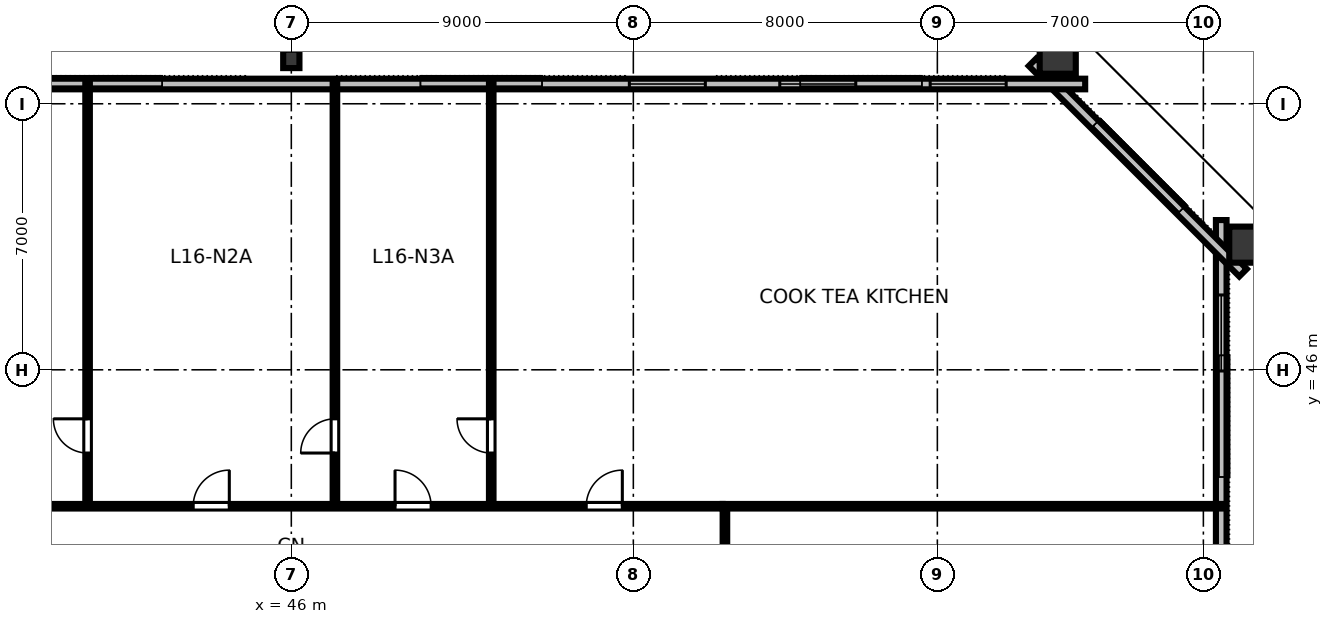
"""IFC4 building model, lengths in metres.
Left out: names, types, materials, properties, quantities, classifications, styles, units other than length and angle.
Written with IfcOpenShell. Run it as: python <this file> out.ifc"""

import sys

from ifc_helpers import new_model, si_unit, direction, frame, frame_2d, origin, origin_2d, place, context, subcontext, project, spatial, rectangle, hollow_rectangle, i_section, extrude, element, fill, save


model = new_model("IFC4")
c1 = context("Model", 3, precision=1e-05, world=origin(), true_north=direction((0.0, 1.0)))
c2 = subcontext(c1, "Body", "Model", "MODEL_VIEW")
j1 = project(units=[si_unit("LENGTHUNIT", "METRE"), si_unit("PLANEANGLEUNIT", "RADIAN")], contexts=[c1])
p1 = place(None, origin())
s1 = spatial("IfcSite", under=j1, at=p1, CompositionType="ELEMENT")
p2 = place(p1, origin())
s2 = spatial("IfcBuilding", under=s1, at=p2, CompositionType="ELEMENT")
p3 = place(p2, frame((0.0, 0.0, 64.0)))
s3 = spatial("IfcBuildingStorey", under=s2, at=p3, CompositionType="ELEMENT", Elevation=64.0)
for number, where, z_axis, x_axis in (
    (1, (71.256, 49.293, 0.0), (0.0, 0.0, 1.0), (0.0, 1.0, 0.0)),
    (2, (66.168, 54.365, 0.0), (0.0, 0.0, 1.0), (1.0, 0.0, 0.0)),
):
    element("IfcColumn", number, at=place(p3, frame(where, z_axis=z_axis, x_axis=x_axis)), inside=s3, PredefinedType="COLUMN", context=c2, shape_type="SweptSolid", body=[
        extrude(hollow_rectangle(XDim=0.95, YDim=1.15, WallThickness=0.06, at=origin_2d()), origin(), (0.0, 0.0, 1.0), 3.358),
    ])
p4 = place(p3, frame((46.0, 54.18, 0.0), z_axis=(0.0, 0.0, 1.0), x_axis=(1.0, 0.0, 0.0)))
e3 = element("IfcColumn", 3, at=p4, inside=s3, PredefinedType="COLUMN", context=c2, shape_type="SweptSolid", body=[
    extrude(i_section(OverallWidth=0.428, OverallDepth=0.483, WebThickness=0.051, FlangeThickness=0.082, FilletRadius=0.025, at=origin_2d()), origin(), (0.0, 0.0, 1.0), 3.358),
])
p5 = place(p3, frame((70.47, 14.06, 0.0), z_axis=(0.0, 0.0, 1.0), x_axis=(0.0, 1.0, 0.0)))
e4 = element("IfcWall", 4, at=p5, inside=s3, PredefinedType="STANDARD", context=c2, shape_type="SweptSolid", body=[
    extrude(rectangle(XDim=35.88, YDim=0.28, at=frame_2d((17.94, 0.0))), origin(), (0.0, 0.0, 1.0), 3.36),
])
p6 = place(p5, frame((19.29, 0.0, 0.0)))
e5 = element("IfcOpeningElement", 5, at=p6, cuts=e4, PredefinedType="OPENING", context=c2, shape_type="SweptSolid", body=[
    extrude(rectangle(XDim=1.4, YDim=2.15, at=frame_2d((0.7, 1.075))), frame((0.0, 0.15, 0.0), z_axis=(0.0, -1.0, 0.0), x_axis=(1.0, 0.0, 0.0)), (0.0, 0.0, 1.0), 0.3),
])
p7 = place(p5, frame((1.971, 0.0, 0.8)))
e6 = element("IfcOpeningElement", 6, at=p7, cuts=e4, PredefinedType="OPENING", context=c2, shape_type="SweptSolid", body=[
    extrude(rectangle(XDim=2.0, YDim=1.95, at=frame_2d((1.0, 0.975))), frame((0.0, 0.15, 0.0), z_axis=(0.0, -1.0, 0.0), x_axis=(1.0, 0.0, 0.0)), (0.0, 0.0, 1.0), 0.3),
])
p8 = place(p5, frame((9.456, 0.0, 0.8)))
e7 = element("IfcOpeningElement", 7, at=p8, cuts=e4, PredefinedType="OPENING", context=c2, shape_type="SweptSolid", body=[
    extrude(rectangle(XDim=2.0, YDim=1.95, at=frame_2d((1.0, 0.975))), frame((0.0, 0.15, 0.0), z_axis=(0.0, -1.0, 0.0), x_axis=(1.0, 0.0, 0.0)), (0.0, 0.0, 1.0), 0.3),
])
p9 = place(p5, frame((24.424, 0.0, 0.8)))
e8 = element("IfcOpeningElement", 8, at=p9, cuts=e4, PredefinedType="OPENING", context=c2, shape_type="SweptSolid", body=[
    extrude(rectangle(XDim=2.0, YDim=1.95, at=frame_2d((1.0, 0.975))), frame((0.0, 0.15, 0.0), z_axis=(0.0, -1.0, 0.0), x_axis=(1.0, 0.0, 0.0)), (0.0, 0.0, 1.0), 0.3),
])
p10 = place(p5, frame((31.909, 0.0, 0.8)))
e9 = element("IfcOpeningElement", 9, at=p10, cuts=e4, PredefinedType="OPENING", context=c2, shape_type="SweptSolid", body=[
    extrude(rectangle(XDim=2.0, YDim=1.95, at=frame_2d((1.0, 0.975))), frame((0.0, 0.15, 0.0), z_axis=(0.0, -1.0, 0.0), x_axis=(1.0, 0.0, 0.0)), (0.0, 0.0, 1.0), 0.3),
])
p11 = place(p3, frame((71.044, 48.554, 0.0), z_axis=(0.0, 0.0, 1.0), x_axis=(-0.707106781187, 0.707106781187, 0.0)))
e10 = element("IfcWall", 10, at=p11, inside=s3, PredefinedType="STANDARD", context=c2, shape_type="SweptSolid", body=[
    extrude(rectangle(XDim=7.834, YDim=0.28, at=frame_2d((3.917, 0.0))), origin(), (0.0, 0.0, 1.0), 3.36),
])
p12 = place(p3, frame((66.89, 53.52, 0.0), z_axis=(0.0, 0.0, 1.0), x_axis=(-1.0, 0.0, 0.0)))
e11 = element("IfcWall", 11, at=p12, inside=s3, PredefinedType="STANDARD", context=c2, shape_type="SweptSolid", body=[
    extrude(rectangle(XDim=41.78, YDim=0.28, at=frame_2d((20.89, 0.0))), origin(), (0.0, 0.0, 1.0), 3.36),
])
p13 = place(p12, frame((2.079, 0.0, 0.8)))
e12 = element("IfcOpeningElement", 12, at=p13, cuts=e11, PredefinedType="OPENING", context=c2, shape_type="SweptSolid", body=[
    extrude(rectangle(XDim=2.0, YDim=1.95, at=frame_2d((1.0, 0.975))), frame((0.0, 0.15, 0.0), z_axis=(0.0, -1.0, 0.0), x_axis=(1.0, 0.0, 0.0)), (0.0, 0.0, 1.0), 0.3),
])
p14 = place(p12, frame((6.037, 0.0, 0.8)))
e13 = element("IfcOpeningElement", 13, at=p14, cuts=e11, PredefinedType="OPENING", context=c2, shape_type="SweptSolid", body=[
    extrude(rectangle(XDim=2.0, YDim=1.95, at=frame_2d((1.0, 0.975))), frame((0.0, 0.15, 0.0), z_axis=(0.0, -1.0, 0.0), x_axis=(1.0, 0.0, 0.0)), (0.0, 0.0, 1.0), 0.3),
])
p15 = place(p12, frame((9.995, 0.0, 0.8)))
e14 = element("IfcOpeningElement", 14, at=p15, cuts=e11, PredefinedType="OPENING", context=c2, shape_type="SweptSolid", body=[
    extrude(rectangle(XDim=2.0, YDim=1.95, at=frame_2d((1.0, 0.975))), frame((0.0, 0.15, 0.0), z_axis=(0.0, -1.0, 0.0), x_axis=(1.0, 0.0, 0.0)), (0.0, 0.0, 1.0), 0.3),
])
p16 = place(p12, frame((29.785, 0.0, 0.8)))
e15 = element("IfcOpeningElement", 15, at=p16, cuts=e11, PredefinedType="OPENING", context=c2, shape_type="SweptSolid", body=[
    extrude(rectangle(XDim=2.0, YDim=1.95, at=frame_2d((1.0, 0.975))), frame((0.0, 0.15, 0.0), z_axis=(0.0, -1.0, 0.0), x_axis=(1.0, 0.0, 0.0)), (0.0, 0.0, 1.0), 0.3),
])
p17 = place(p12, frame((33.743, 0.0, 0.8)))
e16 = element("IfcOpeningElement", 16, at=p17, cuts=e11, PredefinedType="OPENING", context=c2, shape_type="SweptSolid", body=[
    extrude(rectangle(XDim=2.0, YDim=1.95, at=frame_2d((1.0, 0.975))), frame((0.0, 0.15, 0.0), z_axis=(0.0, -1.0, 0.0), x_axis=(1.0, 0.0, 0.0)), (0.0, 0.0, 1.0), 0.3),
])
p18 = place(p12, frame((37.701, 0.0, 0.8)))
e17 = element("IfcOpeningElement", 17, at=p18, cuts=e11, PredefinedType="OPENING", context=c2, shape_type="SweptSolid", body=[
    extrude(rectangle(XDim=2.0, YDim=1.95, at=frame_2d((1.0, 0.975))), frame((0.0, 0.15, 0.0), z_axis=(0.0, -1.0, 0.0), x_axis=(1.0, 0.0, 0.0)), (0.0, 0.0, 1.0), 0.3),
])
p19 = place(p3, frame((40.639, 42.41, 0.0), z_axis=(0.0, 0.0, 1.0), x_axis=(0.0, 1.0, 0.0)))
e18 = element("IfcWall", 18, at=p19, inside=s3, PredefinedType="PARTITIONING", context=c2, shape_type="SweptSolid", body=[
    extrude(rectangle(XDim=11.11, YDim=0.12, at=frame_2d((5.555, 0.0))), origin(), (0.0, 0.0, 1.0), 2.64),
])
p20 = place(p19, frame((1.4, 0.0, 0.0)))
e19 = element("IfcOpeningElement", 19, at=p20, cuts=e18, PredefinedType="OPENING", context=c2, shape_type="SweptSolid", body=[
    extrude(rectangle(XDim=0.9, YDim=2.15, at=frame_2d((0.45, 1.075))), frame((0.0, 0.07, 0.0), z_axis=(0.0, -1.0, 0.0), x_axis=(1.0, 0.0, 0.0)), (0.0, 0.0, 1.0), 0.14),
])
p21 = place(p3, frame((47.148, 42.41, 0.0), z_axis=(0.0, 0.0, 1.0), x_axis=(0.0, 1.0, 0.0)))
e20 = element("IfcWall", 20, at=p21, inside=s3, PredefinedType="PARTITIONING", context=c2, shape_type="SweptSolid", body=[
    extrude(rectangle(XDim=11.11, YDim=0.12, at=frame_2d((5.555, 0.0))), origin(), (0.0, 0.0, 1.0), 2.64),
])
p22 = place(p21, frame((1.4, 0.0, 0.0)))
e21 = element("IfcOpeningElement", 21, at=p22, cuts=e20, PredefinedType="OPENING", context=c2, shape_type="SweptSolid", body=[
    extrude(rectangle(XDim=0.9, YDim=2.15, at=frame_2d((0.45, 1.075))), frame((0.0, 0.07, 0.0), z_axis=(0.0, -1.0, 0.0), x_axis=(1.0, 0.0, 0.0)), (0.0, 0.0, 1.0), 0.14),
])
p23 = place(p3, frame((51.261, 42.41, 0.0), z_axis=(0.0, 0.0, 1.0), x_axis=(0.0, 1.0, 0.0)))
e22 = element("IfcWall", 22, at=p23, inside=s3, PredefinedType="PARTITIONING", context=c2, shape_type="SweptSolid", body=[
    extrude(rectangle(XDim=11.11, YDim=0.12, at=frame_2d((5.555, 0.0))), origin(), (0.0, 0.0, 1.0), 2.64),
])
p24 = place(p23, frame((1.4, 0.0, 0.0)))
e23 = element("IfcOpeningElement", 23, at=p24, cuts=e22, PredefinedType="OPENING", context=c2, shape_type="SweptSolid", body=[
    extrude(rectangle(XDim=0.9, YDim=2.15, at=frame_2d((0.45, 1.075))), frame((0.0, 0.07, 0.0), z_axis=(0.0, -1.0, 0.0), x_axis=(1.0, 0.0, 0.0)), (0.0, 0.0, 1.0), 0.14),
])
p25 = place(p3, frame((34.65, 42.41, 0.0), z_axis=(0.0, 0.0, 1.0), x_axis=(1.0, 0.0, 0.0)))
e24 = element("IfcWall", 24, at=p25, inside=s3, PredefinedType="PARTITIONING", context=c2, shape_type="SweptSolid", body=[
    extrude(rectangle(XDim=22.7, YDim=0.12, at=frame_2d((11.35, 0.0))), origin(), (0.0, 0.0, 1.0), 2.64),
])
p26 = place(p25, frame((2.59, 0.0, 0.0)))
e25 = element("IfcOpeningElement", 25, at=p26, cuts=e24, PredefinedType="OPENING", context=c2, shape_type="SweptSolid", body=[
    extrude(rectangle(XDim=0.95, YDim=2.15, at=frame_2d((0.475, 1.075))), frame((0.0, 0.07, 0.0), z_axis=(0.0, -1.0, 0.0), x_axis=(1.0, 0.0, 0.0)), (0.0, 0.0, 1.0), 0.14),
])
p27 = place(p25, frame((8.768, 0.0, 0.0)))
e26 = element("IfcOpeningElement", 26, at=p27, cuts=e24, PredefinedType="OPENING", context=c2, shape_type="SweptSolid", body=[
    extrude(rectangle(XDim=0.95, YDim=2.15, at=frame_2d((0.475, 1.075))), frame((0.0, 0.07, 0.0), z_axis=(0.0, -1.0, 0.0), x_axis=(1.0, 0.0, 0.0)), (0.0, 0.0, 1.0), 0.14),
])
p28 = place(p25, frame((14.079, 0.0, 0.0)))
e27 = element("IfcOpeningElement", 27, at=p28, cuts=e24, PredefinedType="OPENING", context=c2, shape_type="SweptSolid", body=[
    extrude(rectangle(XDim=0.95, YDim=2.15, at=frame_2d((0.475, 1.075))), frame((0.0, 0.07, 0.0), z_axis=(0.0, -1.0, 0.0), x_axis=(1.0, 0.0, 0.0)), (0.0, 0.0, 1.0), 0.14),
])
p29 = place(p25, frame((19.11, 0.0, 0.0)))
e28 = element("IfcOpeningElement", 28, at=p29, cuts=e24, PredefinedType="OPENING", context=c2, shape_type="SweptSolid", body=[
    extrude(rectangle(XDim=0.95, YDim=2.15, at=frame_2d((0.475, 1.075))), frame((0.0, 0.07, 0.0), z_axis=(0.0, -1.0, 0.0), x_axis=(1.0, 0.0, 0.0)), (0.0, 0.0, 1.0), 0.14),
])
p30 = place(p3, frame((57.41, 21.65, 0.0), z_axis=(0.0, 0.0, 1.0), x_axis=(0.0, 1.0, 0.0)))
e29 = element("IfcWall", 29, at=p30, inside=s3, PredefinedType="PARTITIONING", context=c2, shape_type="SweptSolid", body=[
    extrude(rectangle(XDim=20.7, YDim=0.12, at=frame_2d((10.35, 0.0))), origin(), (0.0, 0.0, 1.0), 2.64),
])
p31 = place(p30, frame((3.502, 0.0, 0.0)))
e30 = element("IfcOpeningElement", 30, at=p31, cuts=e29, PredefinedType="OPENING", context=c2, shape_type="SweptSolid", body=[
    extrude(rectangle(XDim=0.95, YDim=2.15, at=frame_2d((0.475, 1.075))), frame((0.0, 0.07, 0.0), z_axis=(0.0, -1.0, 0.0), x_axis=(1.0, 0.0, 0.0)), (0.0, 0.0, 1.0), 0.14),
])
p32 = place(p30, frame((13.652, 0.0, 0.0)))
e31 = element("IfcOpeningElement", 31, at=p32, cuts=e29, PredefinedType="OPENING", context=c2, shape_type="SweptSolid", body=[
    extrude(rectangle(XDim=0.95, YDim=2.15, at=frame_2d((0.475, 1.075))), frame((0.0, 0.07, 0.0), z_axis=(0.0, -1.0, 0.0), x_axis=(1.0, 0.0, 0.0)), (0.0, 0.0, 1.0), 0.14),
])
p33 = place(p3, frame((57.35, 42.41, 0.0), z_axis=(0.0, 0.0, 1.0), x_axis=(1.0, 0.0, 0.0)))
e32 = element("IfcWall", 32, at=p33, inside=s3, PredefinedType="PARTITIONING", context=c2, shape_type="SweptSolid", body=[
    extrude(rectangle(XDim=13.12, YDim=0.12, at=frame_2d((6.56, 0.0))), origin(), (0.0, 0.0, 1.0), 2.64),
])
p34 = place(p10, origin())
e33 = element("IfcWindow", 33, at=p34, inside=s3, PartitioningType="SINGLE_PANEL", PredefinedType="WINDOW", context=c2, shape_type="SweptSolid", body=[
    extrude(rectangle(XDim=2.0, YDim=1.95, at=frame_2d((1.0, 0.975))), frame((0.0, 0.03, 0.0), z_axis=(0.0, -1.0, 0.0), x_axis=(1.0, 0.0, 0.0)), (0.0, 0.0, 1.0), 0.06),
])
fill(e9, e33)
p35 = place(p13, origin())
e34 = element("IfcWindow", 34, at=p35, inside=s3, PartitioningType="SINGLE_PANEL", PredefinedType="WINDOW", context=c2, shape_type="SweptSolid", body=[
    extrude(rectangle(XDim=2.0, YDim=1.95, at=frame_2d((1.0, 0.975))), frame((0.0, 0.03, 0.0), z_axis=(0.0, -1.0, 0.0), x_axis=(1.0, 0.0, 0.0)), (0.0, 0.0, 1.0), 0.06),
])
fill(e12, e34)
p36 = place(p14, origin())
e35 = element("IfcWindow", 35, at=p36, inside=s3, PartitioningType="SINGLE_PANEL", PredefinedType="WINDOW", context=c2, shape_type="SweptSolid", body=[
    extrude(rectangle(XDim=2.0, YDim=1.95, at=frame_2d((1.0, 0.975))), frame((0.0, 0.03, 0.0), z_axis=(0.0, -1.0, 0.0), x_axis=(1.0, 0.0, 0.0)), (0.0, 0.0, 1.0), 0.06),
])
fill(e13, e35)
p37 = place(p15, origin())
e36 = element("IfcWindow", 36, at=p37, inside=s3, PartitioningType="SINGLE_PANEL", PredefinedType="WINDOW", context=c2, shape_type="SweptSolid", body=[
    extrude(rectangle(XDim=2.0, YDim=1.95, at=frame_2d((1.0, 0.975))), frame((0.0, 0.03, 0.0), z_axis=(0.0, -1.0, 0.0), x_axis=(1.0, 0.0, 0.0)), (0.0, 0.0, 1.0), 0.06),
])
fill(e14, e36)
p38 = place(p20, origin())
e37 = element("IfcDoor", 37, at=p38, inside=s3, OperationType="SINGLE_SWING_RIGHT", PredefinedType="DOOR", context=c2, shape_type="SweptSolid", body=[
    extrude(rectangle(XDim=0.9, YDim=2.15, at=frame_2d((0.45, 1.075))), frame((0.0, 0.025, 0.0), z_axis=(0.0, -1.0, 0.0), x_axis=(1.0, 0.0, 0.0)), (0.0, 0.0, 1.0), 0.05),
])
fill(e19, e37)
p39 = place(p22, origin())
e38 = element("IfcDoor", 38, at=p39, inside=s3, OperationType="SINGLE_SWING_LEFT", PredefinedType="DOOR", context=c2, shape_type="SweptSolid", body=[
    extrude(rectangle(XDim=0.9, YDim=2.15, at=frame_2d((0.45, 1.075))), frame((0.0, 0.025, 0.0), z_axis=(0.0, -1.0, 0.0), x_axis=(1.0, 0.0, 0.0)), (0.0, 0.0, 1.0), 0.05),
])
fill(e21, e38)
p40 = place(p24, origin())
e39 = element("IfcDoor", 39, at=p40, inside=s3, OperationType="SINGLE_SWING_RIGHT", PredefinedType="DOOR", context=c2, shape_type="SweptSolid", body=[
    extrude(rectangle(XDim=0.9, YDim=2.15, at=frame_2d((0.45, 1.075))), frame((0.0, 0.025, 0.0), z_axis=(0.0, -1.0, 0.0), x_axis=(1.0, 0.0, 0.0)), (0.0, 0.0, 1.0), 0.05),
])
fill(e23, e39)
p41 = place(p27, origin())
e40 = element("IfcDoor", 40, at=p41, inside=s3, OperationType="SINGLE_SWING_RIGHT", PredefinedType="DOOR", context=c2, shape_type="SweptSolid", body=[
    extrude(rectangle(XDim=0.95, YDim=2.15, at=frame_2d((0.475, 1.075))), frame((0.0, 0.025, 0.0), z_axis=(0.0, -1.0, 0.0), x_axis=(1.0, 0.0, 0.0)), (0.0, 0.0, 1.0), 0.05),
])
fill(e26, e40)
p42 = place(p28, origin())
e41 = element("IfcDoor", 41, at=p42, inside=s3, OperationType="SINGLE_SWING_LEFT", PredefinedType="DOOR", context=c2, shape_type="SweptSolid", body=[
    extrude(rectangle(XDim=0.95, YDim=2.15, at=frame_2d((0.475, 1.075))), frame((0.0, 0.025, 0.0), z_axis=(0.0, -1.0, 0.0), x_axis=(1.0, 0.0, 0.0)), (0.0, 0.0, 1.0), 0.05),
])
fill(e27, e41)
p43 = place(p29, origin())
e42 = element("IfcDoor", 42, at=p43, inside=s3, OperationType="SINGLE_SWING_RIGHT", PredefinedType="DOOR", context=c2, shape_type="SweptSolid", body=[
    extrude(rectangle(XDim=0.95, YDim=2.15, at=frame_2d((0.475, 1.075))), frame((0.0, 0.025, 0.0), z_axis=(0.0, -1.0, 0.0), x_axis=(1.0, 0.0, 0.0)), (0.0, 0.0, 1.0), 0.05),
])
fill(e28, e42)
save(model, sys.argv[1])
